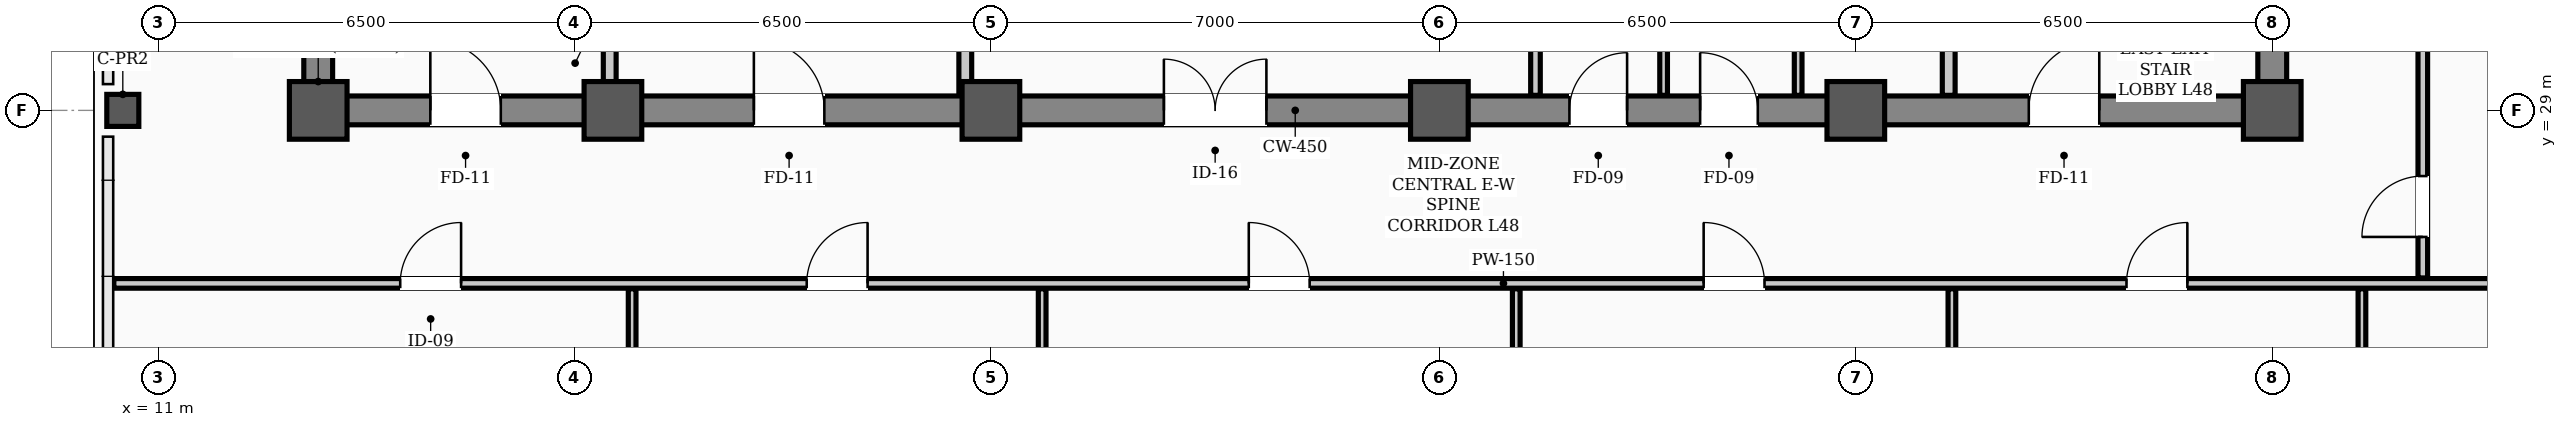
"""IFC4 building model, lengths in metres.
Left out: names, types, materials, properties, quantities, classifications, styles, units other than length and angle.
Written with IfcOpenShell. Run it as: python <this file> out.ifc"""

import sys

from ifc_helpers import new_model, si_unit, direction, frame, frame_2d, origin, origin_2d, place, context, subcontext, project, spatial, rectangle, hollow_rectangle, extrude, element, fill, save


model = new_model("IFC4")
c1 = context("Model", 3, precision=1e-05, world=origin(), true_north=direction((0.0, 1.0)))
c2 = subcontext(c1, "Body", "Model", "MODEL_VIEW")
j1 = project(units=[si_unit("LENGTHUNIT", "METRE"), si_unit("PLANEANGLEUNIT", "RADIAN")], contexts=[c1])
p1 = place(None, origin())
s1 = spatial("IfcSite", under=j1, at=p1, CompositionType="ELEMENT")
p2 = place(p1, origin())
s2 = spatial("IfcBuilding", under=s1, at=p2, CompositionType="ELEMENT")
p3 = place(p2, frame((0.0, 0.0, 192.9)))
s3 = spatial("IfcBuildingStorey", under=s2, at=p3, CompositionType="ELEMENT", Elevation=192.9)
for number, where, z_axis, x_axis in (
    (1, (13.5, 29.0, 0.0), (0.0, 0.0, 1.0), (1.0, 0.0, 0.0)),
    (2, (18.1, 29.0, 0.0), (0.0, 0.0, 1.0), (1.0, 0.0, 0.0)),
    (3, (24.0, 29.0, 0.0), (0.0, 0.0, 1.0), (1.0, 0.0, 0.0)),
    (4, (31.0, 29.0, 0.0), (0.0, 0.0, 1.0), (1.0, 0.0, 0.0)),
    (5, (37.5, 29.0, 0.0), (0.0, 0.0, 1.0), (1.0, 0.0, 0.0)),
    (6, (44.0, 29.0, 0.0), (0.0, 0.0, 1.0), (1.0, 0.0, 0.0)),
):
    element("IfcColumn", number, at=place(p3, frame(where, z_axis=z_axis, x_axis=x_axis)), inside=s3, PredefinedType="COLUMN", context=c2, shape_type="SweptSolid", body=[
        extrude(hollow_rectangle(XDim=0.9, YDim=0.9, WallThickness=0.035, InnerFilletRadius=0.017, OuterFilletRadius=0.052, at=origin_2d()), origin(), (0.0, 0.0, 1.0), 3.9),
    ])
p4 = place(p3, frame((10.45, 29.0, 0.0), z_axis=(0.0, 0.0, 1.0), x_axis=(1.0, 0.0, 0.0)))
e7 = element("IfcColumn", 7, at=p4, inside=s3, PredefinedType="COLUMN", context=c2, shape_type="SweptSolid", body=[
    extrude(hollow_rectangle(XDim=0.5, YDim=0.5, WallThickness=0.024, InnerFilletRadius=0.012, OuterFilletRadius=0.036, at=origin_2d()), origin(), (0.0, 0.0, 1.0), 3.9),
])
p5 = place(p3, frame((13.5, 29.0, 0.0), z_axis=(0.0, 0.0, 1.0), x_axis=(1.0, 0.0, 0.0)))
e8 = element("IfcWall", 8, at=p5, inside=s3, PredefinedType="SHEAR", context=c2, shape_type="SweptSolid", body=[
    extrude(rectangle(XDim=30.5, YDim=0.45, at=frame_2d((15.25, 0.0))), origin(), (0.0, 0.0, 1.0), 3.66),
])
p6 = place(p5, frame((1.75, 0.0, 0.0)))
e9 = element("IfcOpeningElement", 9, at=p6, cuts=e8, PredefinedType="OPENING", context=c2, shape_type="SweptSolid", body=[
    extrude(rectangle(XDim=1.1, YDim=2.08, at=frame_2d((0.55, 1.04))), frame((0.0, 0.235, 0.0), z_axis=(0.0, -1.0, 0.0), x_axis=(1.0, 0.0, 0.0)), (0.0, 0.0, 1.0), 0.47),
])
p7 = place(p5, frame((26.7, 0.0, 0.0)))
e10 = element("IfcOpeningElement", 10, at=p7, cuts=e8, PredefinedType="OPENING", context=c2, shape_type="SweptSolid", body=[
    extrude(rectangle(XDim=1.1, YDim=2.08, at=frame_2d((0.55, 1.04))), frame((0.0, 0.235, 0.0), z_axis=(0.0, -1.0, 0.0), x_axis=(1.0, 0.0, 0.0)), (0.0, 0.0, 1.0), 0.47),
])
p8 = place(p5, frame((6.8, 0.0, 0.0)))
e11 = element("IfcOpeningElement", 11, at=p8, cuts=e8, PredefinedType="OPENING", context=c2, shape_type="SweptSolid", body=[
    extrude(rectangle(XDim=1.1, YDim=2.08, at=frame_2d((0.55, 1.04))), frame((0.0, 0.235, 0.0), z_axis=(0.0, -1.0, 0.0), x_axis=(1.0, 0.0, 0.0)), (0.0, 0.0, 1.0), 0.47),
])
p9 = place(p5, frame((13.2, 0.0, 0.0)))
e12 = element("IfcOpeningElement", 12, at=p9, cuts=e8, PredefinedType="OPENING", context=c2, shape_type="SweptSolid", body=[
    extrude(rectangle(XDim=1.6, YDim=2.08, at=frame_2d((0.8, 1.04))), frame((0.0, 0.235, 0.0), z_axis=(0.0, -1.0, 0.0), x_axis=(1.0, 0.0, 0.0)), (0.0, 0.0, 1.0), 0.47),
])
p10 = place(p5, frame((19.53, 0.0, 0.0)))
e13 = element("IfcOpeningElement", 13, at=p10, cuts=e8, PredefinedType="OPENING", context=c2, shape_type="SweptSolid", body=[
    extrude(rectangle(XDim=0.9, YDim=2.08, at=frame_2d((0.45, 1.04))), frame((0.0, 0.235, 0.0), z_axis=(0.0, -1.0, 0.0), x_axis=(1.0, 0.0, 0.0)), (0.0, 0.0, 1.0), 0.47),
])
p11 = place(p5, frame((21.57, 0.0, 0.0)))
e14 = element("IfcOpeningElement", 14, at=p11, cuts=e8, PredefinedType="OPENING", context=c2, shape_type="SweptSolid", body=[
    extrude(rectangle(XDim=0.9, YDim=2.08, at=frame_2d((0.45, 1.04))), frame((0.0, 0.235, 0.0), z_axis=(0.0, -1.0, 0.0), x_axis=(1.0, 0.0, 0.0)), (0.0, 0.0, 1.0), 0.47),
])
for number, where, z_axis, x_axis in (
    (15, (13.5, 29.35, 0.0), (0.0, 0.0, 1.0), (0.0, 1.0, 0.0)),
    (16, (44.0, 29.35, 0.0), (0.0, 0.0, 1.0), (0.0, 1.0, 0.0)),
):
    element("IfcWall", number, at=place(p3, frame(where, z_axis=z_axis, x_axis=x_axis)), inside=s3, PredefinedType="SHEAR", context=c2, shape_type="SweptSolid", body=[
        extrude(rectangle(XDim=8.6, YDim=0.45, at=frame_2d((4.3, 0.0))), origin(), (0.0, 0.0, 1.0), 3.66),
    ])
p12 = place(p3, frame((10.31, 26.3, 0.0), z_axis=(0.0, 0.0, 1.0), x_axis=(1.0, 0.0, 0.0)))
e17 = element("IfcWall", 17, at=p12, inside=s3, PredefinedType="PARTITIONING", context=c2, shape_type="SweptSolid", body=[
    extrude(rectangle(XDim=43.38, YDim=0.15, at=frame_2d((21.69, 0.0))), origin(), (0.0, 0.0, 1.0), 2.24),
])
p13 = place(p12, frame((4.47, 0.0, 0.0)))
e18 = element("IfcOpeningElement", 18, at=p13, cuts=e17, PredefinedType="OPENING", context=c2, shape_type="SweptSolid", body=[
    extrude(rectangle(XDim=0.95, YDim=2.08, at=frame_2d((0.475, 1.04))), frame((0.0, 0.085, 0.0), z_axis=(0.0, -1.0, 0.0), x_axis=(1.0, 0.0, 0.0)), (0.0, 0.0, 1.0), 0.17),
])
p14 = place(p12, frame((10.815, 0.0, 0.0)))
e19 = element("IfcOpeningElement", 19, at=p14, cuts=e17, PredefinedType="OPENING", context=c2, shape_type="SweptSolid", body=[
    extrude(rectangle(XDim=0.95, YDim=2.08, at=frame_2d((0.475, 1.04))), frame((0.0, 0.085, 0.0), z_axis=(0.0, -1.0, 0.0), x_axis=(1.0, 0.0, 0.0)), (0.0, 0.0, 1.0), 0.17),
])
p15 = place(p12, frame((17.715, 0.0, 0.0)))
e20 = element("IfcOpeningElement", 20, at=p15, cuts=e17, PredefinedType="OPENING", context=c2, shape_type="SweptSolid", body=[
    extrude(rectangle(XDim=0.95, YDim=2.08, at=frame_2d((0.475, 1.04))), frame((0.0, 0.085, 0.0), z_axis=(0.0, -1.0, 0.0), x_axis=(1.0, 0.0, 0.0)), (0.0, 0.0, 1.0), 0.17),
])
p16 = place(p12, frame((24.815, 0.0, 0.0)))
e21 = element("IfcOpeningElement", 21, at=p16, cuts=e17, PredefinedType="OPENING", context=c2, shape_type="SweptSolid", body=[
    extrude(rectangle(XDim=0.95, YDim=2.08, at=frame_2d((0.475, 1.04))), frame((0.0, 0.085, 0.0), z_axis=(0.0, -1.0, 0.0), x_axis=(1.0, 0.0, 0.0)), (0.0, 0.0, 1.0), 0.17),
])
p17 = place(p12, frame((31.415, 0.0, 0.0)))
e22 = element("IfcOpeningElement", 22, at=p17, cuts=e17, PredefinedType="OPENING", context=c2, shape_type="SweptSolid", body=[
    extrude(rectangle(XDim=0.95, YDim=2.08, at=frame_2d((0.475, 1.04))), frame((0.0, 0.085, 0.0), z_axis=(0.0, -1.0, 0.0), x_axis=(1.0, 0.0, 0.0)), (0.0, 0.0, 1.0), 0.17),
])
for number, where, z_axis, x_axis in (
    (23, (18.05, 29.235, 0.0), (0.0, 0.0, 1.0), (0.0, 1.0, 0.0)),
    (24, (38.95, 29.235, 0.0), (0.0, 0.0, 1.0), (0.0, 1.0, 0.0)),
):
    element("IfcWall", number, at=place(p3, frame(where, z_axis=z_axis, x_axis=x_axis)), inside=s3, PredefinedType="STANDARD", context=c2, shape_type="SweptSolid", body=[
        extrude(rectangle(XDim=1.065, YDim=0.2, at=frame_2d((0.532, 0.0))), origin(), (0.0, 0.0, 1.0), 2.24),
    ])
p18 = place(p3, frame((23.6, 29.235, 0.0), z_axis=(0.0, 0.0, 1.0), x_axis=(0.0, 1.0, 0.0)))
e25 = element("IfcWall", 25, at=p18, inside=s3, PredefinedType="STANDARD", context=c2, shape_type="SweptSolid", body=[
    extrude(rectangle(XDim=5.465, YDim=0.2, at=frame_2d((2.732, 0.0))), origin(), (0.0, 0.0, 1.0), 2.24),
])
p19 = place(p3, frame((32.5, 29.235, 0.0), z_axis=(0.0, 0.0, 1.0), x_axis=(0.0, 1.0, 0.0)))
e26 = element("IfcWall", 26, at=p19, inside=s3, PredefinedType="PARTITIONING", context=c2, shape_type="SweptSolid", body=[
    extrude(rectangle(XDim=2.53, YDim=0.15, at=frame_2d((1.265, 0.0))), origin(), (0.0, 0.0, 1.0), 2.24),
])
for number, where, z_axis, x_axis in (
    (27, (36.6, 29.235, 0.0), (0.0, 0.0, 1.0), (0.0, 1.0, 0.0)),
    (28, (34.5, 29.235, 0.0), (0.0, 0.0, 1.0), (0.0, 1.0, 0.0)),
):
    element("IfcWall", number, at=place(p3, frame(where, z_axis=z_axis, x_axis=x_axis)), inside=s3, PredefinedType="PARTITIONING", context=c2, shape_type="SweptSolid", body=[
        extrude(rectangle(XDim=2.53, YDim=0.12, at=frame_2d((1.265, 0.0))), origin(), (0.0, 0.0, 1.0), 2.24),
    ])
p20 = place(p3, frame((46.35, 26.385, 0.0), z_axis=(0.0, 0.0, 1.0), x_axis=(0.0, 1.0, 0.0)))
e29 = element("IfcWall", 29, at=p20, inside=s3, PredefinedType="PARTITIONING", context=c2, shape_type="SweptSolid", body=[
    extrude(rectangle(XDim=13.58, YDim=0.15, at=frame_2d((6.79, 0.0))), origin(), (0.0, 0.0, 1.0), 2.24),
])
p21 = place(p20, frame((0.64, 0.0, 0.0)))
e30 = element("IfcOpeningElement", 30, at=p21, cuts=e29, PredefinedType="OPENING", context=c2, shape_type="SweptSolid", body=[
    extrude(rectangle(XDim=0.95, YDim=2.08, at=frame_2d((0.475, 1.04))), frame((0.0, 0.085, 0.0), z_axis=(0.0, -1.0, 0.0), x_axis=(1.0, 0.0, 0.0)), (0.0, 0.0, 1.0), 0.17),
])
p22 = place(p20, frame((7.04, 0.0, 0.0)))
e31 = element("IfcOpeningElement", 31, at=p22, cuts=e29, PredefinedType="OPENING", context=c2, shape_type="SweptSolid", body=[
    extrude(rectangle(XDim=0.95, YDim=2.08, at=frame_2d((0.475, 1.04))), frame((0.0, 0.085, 0.0), z_axis=(0.0, -1.0, 0.0), x_axis=(1.0, 0.0, 0.0)), (0.0, 0.0, 1.0), 0.17),
])
p23 = place(p20, frame((11.065, 0.0, 0.0)))
e32 = element("IfcOpeningElement", 32, at=p23, cuts=e29, PredefinedType="OPENING", context=c2, shape_type="SweptSolid", body=[
    extrude(rectangle(XDim=0.95, YDim=2.08, at=frame_2d((0.475, 1.04))), frame((0.0, 0.085, 0.0), z_axis=(0.0, -1.0, 0.0), x_axis=(1.0, 0.0, 0.0)), (0.0, 0.0, 1.0), 0.17),
])
p24 = place(p3, frame((18.4, 17.06, 0.0), z_axis=(0.0, 0.0, 1.0), x_axis=(0.0, 1.0, 0.0)))
e33 = element("IfcWall", 33, at=p24, inside=s3, PredefinedType="PARTITIONING", context=c2, shape_type="SweptSolid", body=[
    extrude(rectangle(XDim=9.155, YDim=0.12, at=frame_2d((4.578, 0.0))), origin(), (0.0, 0.0, 1.0), 2.24),
])
p25 = place(p3, frame((24.8, 18.82, 0.0), z_axis=(0.0, 0.0, 1.0), x_axis=(0.0, 1.0, 0.0)))
e34 = element("IfcWall", 34, at=p25, inside=s3, PredefinedType="PARTITIONING", context=c2, shape_type="SweptSolid", body=[
    extrude(rectangle(XDim=7.395, YDim=0.12, at=frame_2d((3.698, 0.0))), origin(), (0.0, 0.0, 1.0), 2.24),
])
for number, where, z_axis, x_axis in (
    (35, (32.2, 17.06, 0.0), (0.0, 0.0, 1.0), (0.0, 1.0, 0.0)),
    (36, (39.0, 17.06, 0.0), (0.0, 0.0, 1.0), (0.0, 1.0, 0.0)),
):
    element("IfcWall", number, at=place(p3, frame(where, z_axis=z_axis, x_axis=x_axis)), inside=s3, PredefinedType="PARTITIONING", context=c2, shape_type="SweptSolid", body=[
        extrude(rectangle(XDim=9.155, YDim=0.12, at=frame_2d((4.578, 0.0))), origin(), (0.0, 0.0, 1.0), 2.24),
    ])
p26 = place(p3, frame((45.4, 17.06, 0.0), z_axis=(0.0, 0.0, 1.0), x_axis=(0.0, 1.0, 0.0)))
e37 = element("IfcWall", 37, at=p26, inside=s3, PredefinedType="PARTITIONING", context=c2, shape_type="SweptSolid", body=[
    extrude(rectangle(XDim=9.155, YDim=0.12, at=frame_2d((4.578, 0.0))), origin(), (0.0, 0.0, 1.0), 2.24),
])
p27 = place(p26, frame((7.165, 0.0, 0.0)))
e38 = element("IfcOpeningElement", 38, at=p27, cuts=e37, PredefinedType="OPENING", context=c2, shape_type="SweptSolid", body=[
    extrude(rectangle(XDim=0.95, YDim=2.08, at=frame_2d((0.475, 1.04))), frame((0.0, 0.07, 0.0), z_axis=(0.0, -1.0, 0.0), x_axis=(1.0, 0.0, 0.0)), (0.0, 0.0, 1.0), 0.14),
])
p28 = place(p6, origin())
e39 = element("IfcDoor", 39, at=p28, inside=s3, OperationType="SINGLE_SWING_LEFT", PredefinedType="DOOR", context=c2, shape_type="SweptSolid", body=[
    extrude(rectangle(XDim=1.1, YDim=2.08, at=frame_2d((0.55, 1.04))), frame((0.0, 0.025, 0.0), z_axis=(0.0, -1.0, 0.0), x_axis=(1.0, 0.0, 0.0)), (0.0, 0.0, 1.0), 0.05),
])
fill(e9, e39)
p29 = place(p7, origin())
e40 = element("IfcDoor", 40, at=p29, inside=s3, OperationType="SINGLE_SWING_RIGHT", PredefinedType="DOOR", context=c2, shape_type="SweptSolid", body=[
    extrude(rectangle(XDim=1.1, YDim=2.08, at=frame_2d((0.55, 1.04))), frame((0.0, 0.025, 0.0), z_axis=(0.0, -1.0, 0.0), x_axis=(1.0, 0.0, 0.0)), (0.0, 0.0, 1.0), 0.05),
])
fill(e10, e40)
p30 = place(p8, origin())
e41 = element("IfcDoor", 41, at=p30, inside=s3, OperationType="SINGLE_SWING_LEFT", PredefinedType="DOOR", context=c2, shape_type="SweptSolid", body=[
    extrude(rectangle(XDim=1.1, YDim=2.08, at=frame_2d((0.55, 1.04))), frame((0.0, 0.025, 0.0), z_axis=(0.0, -1.0, 0.0), x_axis=(1.0, 0.0, 0.0)), (0.0, 0.0, 1.0), 0.05),
])
fill(e11, e41)
p31 = place(p9, origin())
e42 = element("IfcDoor", 42, at=p31, inside=s3, OperationType="DOUBLE_DOOR_SINGLE_SWING", PredefinedType="DOOR", context=c2, shape_type="SweptSolid", body=[
    extrude(rectangle(XDim=1.6, YDim=2.08, at=frame_2d((0.8, 1.04))), frame((0.0, 0.025, 0.0), z_axis=(0.0, -1.0, 0.0), x_axis=(1.0, 0.0, 0.0)), (0.0, 0.0, 1.0), 0.05),
])
fill(e12, e42)
p32 = place(p10, origin())
e43 = element("IfcDoor", 43, at=p32, inside=s3, OperationType="SINGLE_SWING_RIGHT", PredefinedType="DOOR", context=c2, shape_type="SweptSolid", body=[
    extrude(rectangle(XDim=0.9, YDim=2.08, at=frame_2d((0.45, 1.04))), frame((0.0, 0.025, 0.0), z_axis=(0.0, -1.0, 0.0), x_axis=(1.0, 0.0, 0.0)), (0.0, 0.0, 1.0), 0.05),
])
fill(e13, e43)
p33 = place(p11, origin())
e44 = element("IfcDoor", 44, at=p33, inside=s3, OperationType="SINGLE_SWING_LEFT", PredefinedType="DOOR", context=c2, shape_type="SweptSolid", body=[
    extrude(rectangle(XDim=0.9, YDim=2.08, at=frame_2d((0.45, 1.04))), frame((0.0, 0.025, 0.0), z_axis=(0.0, -1.0, 0.0), x_axis=(1.0, 0.0, 0.0)), (0.0, 0.0, 1.0), 0.05),
])
fill(e14, e44)
p34 = place(p13, origin())
e45 = element("IfcDoor", 45, at=p34, inside=s3, OperationType="SINGLE_SWING_RIGHT", PredefinedType="DOOR", context=c2, shape_type="SweptSolid", body=[
    extrude(rectangle(XDim=0.95, YDim=2.08, at=frame_2d((0.475, 1.04))), frame((0.0, 0.025, 0.0), z_axis=(0.0, -1.0, 0.0), x_axis=(1.0, 0.0, 0.0)), (0.0, 0.0, 1.0), 0.05),
])
fill(e18, e45)
p35 = place(p14, origin())
e46 = element("IfcDoor", 46, at=p35, inside=s3, OperationType="SINGLE_SWING_RIGHT", PredefinedType="DOOR", context=c2, shape_type="SweptSolid", body=[
    extrude(rectangle(XDim=0.95, YDim=2.08, at=frame_2d((0.475, 1.04))), frame((0.0, 0.025, 0.0), z_axis=(0.0, -1.0, 0.0), x_axis=(1.0, 0.0, 0.0)), (0.0, 0.0, 1.0), 0.05),
])
fill(e19, e46)
p36 = place(p15, origin())
e47 = element("IfcDoor", 47, at=p36, inside=s3, OperationType="SINGLE_SWING_LEFT", PredefinedType="DOOR", context=c2, shape_type="SweptSolid", body=[
    extrude(rectangle(XDim=0.95, YDim=2.08, at=frame_2d((0.475, 1.04))), frame((0.0, 0.025, 0.0), z_axis=(0.0, -1.0, 0.0), x_axis=(1.0, 0.0, 0.0)), (0.0, 0.0, 1.0), 0.05),
])
fill(e20, e47)
p37 = place(p16, origin())
e48 = element("IfcDoor", 48, at=p37, inside=s3, OperationType="SINGLE_SWING_LEFT", PredefinedType="DOOR", context=c2, shape_type="SweptSolid", body=[
    extrude(rectangle(XDim=0.95, YDim=2.08, at=frame_2d((0.475, 1.04))), frame((0.0, 0.025, 0.0), z_axis=(0.0, -1.0, 0.0), x_axis=(1.0, 0.0, 0.0)), (0.0, 0.0, 1.0), 0.05),
])
fill(e21, e48)
p38 = place(p17, origin())
e49 = element("IfcDoor", 49, at=p38, inside=s3, OperationType="SINGLE_SWING_RIGHT", PredefinedType="DOOR", context=c2, shape_type="SweptSolid", body=[
    extrude(rectangle(XDim=0.95, YDim=2.08, at=frame_2d((0.475, 1.04))), frame((0.0, 0.025, 0.0), z_axis=(0.0, -1.0, 0.0), x_axis=(1.0, 0.0, 0.0)), (0.0, 0.0, 1.0), 0.05),
])
fill(e22, e49)
p39 = place(p21, origin())
e50 = element("IfcDoor", 50, at=p39, inside=s3, OperationType="SINGLE_SWING_LEFT", PredefinedType="DOOR", context=c2, shape_type="SweptSolid", body=[
    extrude(rectangle(XDim=0.95, YDim=2.08, at=frame_2d((0.475, 1.04))), frame((0.0, 0.025, 0.0), z_axis=(0.0, -1.0, 0.0), x_axis=(1.0, 0.0, 0.0)), (0.0, 0.0, 1.0), 0.05),
])
fill(e30, e50)
save(model, sys.argv[1])
